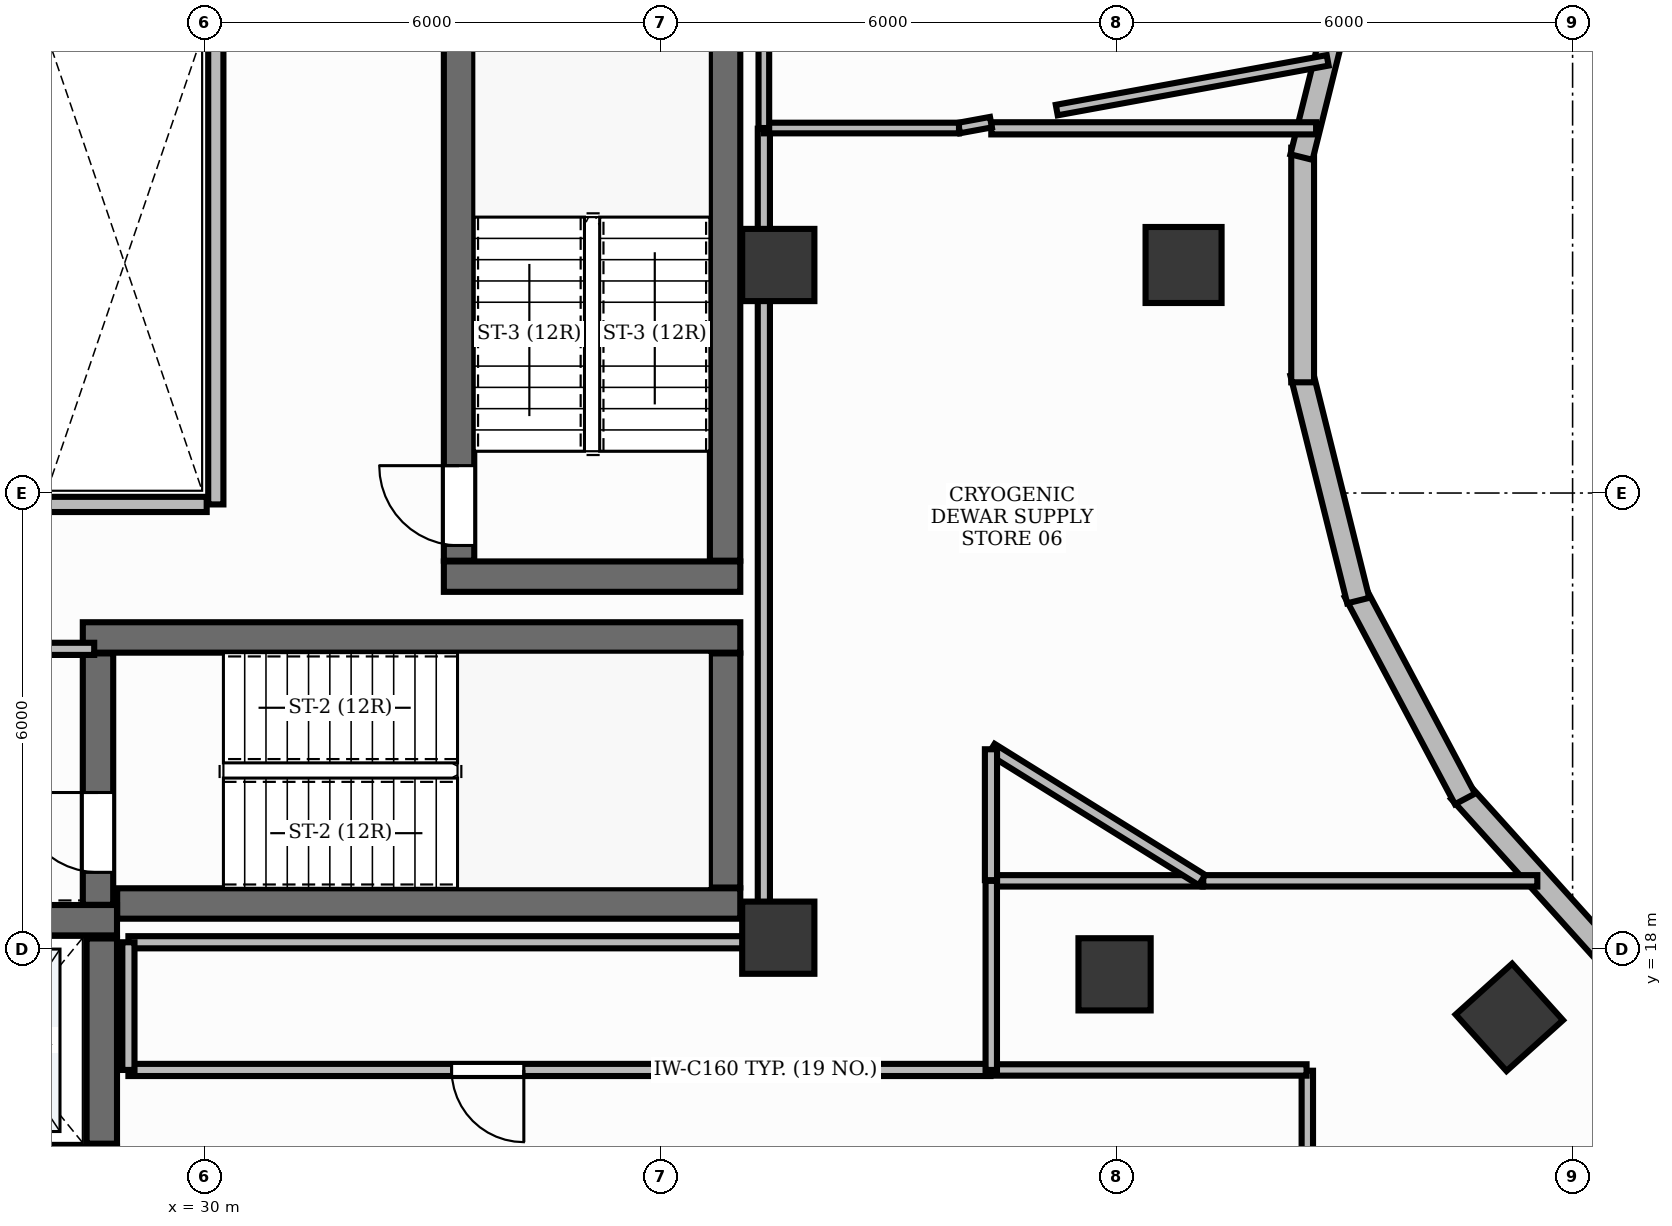
"""IFC4 building model, lengths in metres.
Left out: names, types, materials, properties, quantities, classifications, styles, units other than length and angle.
Written with IfcOpenShell. Run it as: python <this file> out.ifc"""

import sys

from ifc_helpers import new_model, si_unit, direction, frame, frame_2d, origin, origin_2d, place, context, subcontext, project, spatial, rectangle, extrude, element, fill, save


model = new_model("IFC4")
c1 = context("Model", 3, precision=1e-05, world=origin(), true_north=direction((0.0, 1.0)))
c2 = subcontext(c1, "Body", "Model", "MODEL_VIEW")
j1 = project(units=[si_unit("LENGTHUNIT", "METRE"), si_unit("PLANEANGLEUNIT", "RADIAN")], contexts=[c1])
p1 = place(None, origin())
s1 = spatial("IfcSite", under=j1, at=p1, CompositionType="ELEMENT")
p2 = place(p1, origin())
s2 = spatial("IfcBuilding", under=s1, at=p2, CompositionType="ELEMENT")
p3 = place(p2, frame((0.0, 0.0, 196.2)))
s3 = spatial("IfcBuildingStorey", under=s2, at=p3, CompositionType="ELEMENT", Elevation=196.2)
p4 = place(p3, frame((28.852, 18.6, 0.0), z_axis=(0.0, 0.0, 1.0), x_axis=(1.0, 0.0, 0.0)))
e1 = element("IfcWall", 1, at=p4, inside=s3, PredefinedType="SHEAR", context=c2, shape_type="SweptSolid", body=[
    extrude(rectangle(XDim=8.198, YDim=0.4, at=frame_2d((4.099, 0.0))), origin(), (0.0, 0.0, 1.0), 3.9),
])
p5 = place(p3, frame((28.4, 22.1, 0.0), z_axis=(0.0, 0.0, 1.0), x_axis=(1.0, 0.0, 0.0)))
e2 = element("IfcWall", 2, at=p5, inside=s3, PredefinedType="SHEAR", context=c2, shape_type="SweptSolid", body=[
    extrude(rectangle(XDim=8.65, YDim=0.4, at=frame_2d((4.325, 0.0))), origin(), (0.0, 0.0, 1.0), 3.9),
])
p6 = place(p3, frame((36.85, 18.81, 0.0), z_axis=(0.0, 0.0, 1.0), x_axis=(0.0, 1.0, 0.0)))
e3 = element("IfcWall", 3, at=p6, inside=s3, PredefinedType="SHEAR", context=c2, shape_type="SweptSolid", body=[
    extrude(rectangle(XDim=3.08, YDim=0.4, at=frame_2d((1.54, 0.0))), origin(), (0.0, 0.0, 1.0), 3.9),
])
p7 = place(p3, frame((28.6, 18.582, 0.0), z_axis=(0.0, 0.0, 1.0), x_axis=(0.0, 1.0, 0.0)))
e4 = element("IfcWall", 4, at=p7, inside=s3, PredefinedType="SHEAR", context=c2, shape_type="SweptSolid", body=[
    extrude(rectangle(XDim=3.308, YDim=0.4, at=frame_2d((1.654, 0.0))), origin(), (0.0, 0.0, 1.0), 3.9),
])
p8 = place(p7, frame((0.428, 0.0, 0.0)))
e5 = element("IfcOpeningElement", 5, at=p8, cuts=e4, PredefinedType="OPENING", context=c2, shape_type="SweptSolid", body=[
    extrude(rectangle(XDim=1.05, YDim=2.15, at=frame_2d((0.525, 1.075))), frame((0.0, 0.215, 0.0), z_axis=(0.0, -1.0, 0.0), x_axis=(1.0, 0.0, 0.0)), (0.0, 0.0, 1.0), 0.43),
])
p9 = place(p3, frame((33.15, 22.9, 0.0), z_axis=(0.0, 0.0, 1.0), x_axis=(1.0, 0.0, 0.0)))
e6 = element("IfcWall", 6, at=p9, inside=s3, PredefinedType="SHEAR", context=c2, shape_type="SweptSolid", body=[
    extrude(rectangle(XDim=3.9, YDim=0.4, at=frame_2d((1.95, 0.0))), origin(), (0.0, 0.0, 1.0), 3.9),
])
p10 = place(p3, frame((36.85, 23.11, 0.0), z_axis=(0.0, 0.0, 1.0), x_axis=(0.0, 1.0, 0.0)))
e7 = element("IfcWall", 7, at=p10, inside=s3, PredefinedType="SHEAR", context=c2, shape_type="SweptSolid", body=[
    extrude(rectangle(XDim=7.78, YDim=0.4, at=frame_2d((3.89, 0.0))), origin(), (0.0, 0.0, 1.0), 3.9),
])
p11 = place(p3, frame((33.35, 23.11, 0.0), z_axis=(0.0, 0.0, 1.0), x_axis=(0.0, 1.0, 0.0)))
e8 = element("IfcWall", 8, at=p11, inside=s3, PredefinedType="SHEAR", context=c2, shape_type="SweptSolid", body=[
    extrude(rectangle(XDim=7.78, YDim=0.4, at=frame_2d((3.89, 0.0))), origin(), (0.0, 0.0, 1.0), 3.9),
])
p12 = place(p11, frame((0.2, 0.0, 0.0)))
e9 = element("IfcOpeningElement", 9, at=p12, cuts=e8, PredefinedType="OPENING", context=c2, shape_type="SweptSolid", body=[
    extrude(rectangle(XDim=1.05, YDim=2.15, at=frame_2d((0.525, 1.075))), frame((0.0, 0.215, 0.0), z_axis=(0.0, -1.0, 0.0), x_axis=(1.0, 0.0, 0.0)), (0.0, 0.0, 1.0), 0.43),
])
p13 = place(p3, frame((25.75, 18.38, 0.0), z_axis=(0.0, 0.0, 1.0), x_axis=(1.0, 0.0, 0.0)))
e10 = element("IfcWall", 10, at=p13, inside=s3, PredefinedType="SHEAR", context=c2, shape_type="SweptSolid", body=[
    extrude(rectangle(XDim=3.1, YDim=0.4, at=frame_2d((1.55, 0.0))), origin(), (0.0, 0.0, 1.0), 3.9),
])
p14 = place(p13, frame((0.9, 0.0, 0.0)))
e11 = element("IfcOpeningElement", 11, at=p14, cuts=e10, PredefinedType="OPENING", context=c2, shape_type="SweptSolid", body=[
    extrude(rectangle(XDim=1.3, YDim=2.2, at=frame_2d((0.65, 1.1))), frame((0.0, 0.215, 0.0), z_axis=(0.0, -1.0, 0.0), x_axis=(1.0, 0.0, 0.0)), (0.0, 0.0, 1.0), 0.43),
])
p15 = place(p3, frame((28.65, 15.44, 0.0), z_axis=(0.0, 0.0, 1.0), x_axis=(0.0, 1.0, 0.0)))
e12 = element("IfcWall", 12, at=p15, inside=s3, PredefinedType="SHEAR", context=c2, shape_type="SweptSolid", body=[
    extrude(rectangle(XDim=2.7, YDim=0.4, at=frame_2d((1.35, 0.0))), origin(), (0.0, 0.0, 1.0), 3.9),
])
for number, where, z_axis, x_axis in (
    (13, (37.55, 18.15, -0.0), (0.0, 0.0, 1.0), (1.0, 0.0, 0.0)),
    (14, (37.55, 27.0, -0.0), (0.0, 0.0, 1.0), (1.0, 0.0, 0.0)),
):
    element("IfcColumn", number, at=place(p3, frame(where, z_axis=z_axis, x_axis=x_axis)), inside=s3, PredefinedType="PILASTER", context=c2, shape_type="SweptSolid", body=[
        extrude(rectangle(XDim=0.95, YDim=0.95, at=origin_2d()), origin(), (0.0, 0.0, 1.0), 3.901),
    ])
p16 = place(p3, frame((47.167, 17.102, -0.0), z_axis=(0.0, 0.0, 1.0), x_axis=(-0.669130606359, 0.743144825477, 0.0)))
e15 = element("IfcColumn", 15, at=p16, inside=s3, PredefinedType="COLUMN", context=c2, shape_type="SweptSolid", body=[
    extrude(rectangle(XDim=1.0, YDim=1.0, at=origin_2d()), origin(), (0.0, 0.0, 1.0), 3.901),
])
p17 = place(p3, frame((41.974, 17.668, -0.0), z_axis=(0.0, 0.0, 1.0), x_axis=(1.0, 0.0, 0.0)))
e16 = element("IfcColumn", 16, at=p17, inside=s3, PredefinedType="COLUMN", context=c2, shape_type="SweptSolid", body=[
    extrude(rectangle(XDim=0.95, YDim=0.95, at=origin_2d()), origin(), (0.0, 0.0, 1.0), 3.901),
])
p18 = place(p3, frame((42.882, 27.0, -0.0), z_axis=(0.0, 0.0, 1.0), x_axis=(0.0, 1.0, 0.0)))
e17 = element("IfcColumn", 17, at=p18, inside=s3, PredefinedType="COLUMN", context=c2, shape_type="SweptSolid", body=[
    extrude(rectangle(XDim=1.0, YDim=1.0, at=origin_2d()), origin(), (0.0, 0.0, 1.0), 3.901),
])
p19 = place(p3, frame((48.579, 17.784, 0.0), z_axis=(0.0, 0.0, 1.0), x_axis=(-0.669165704933, 0.743113221079, 0.0)))
e18 = element("IfcWall", 18, at=p19, inside=s3, PredefinedType="STANDARD", context=c2, shape_type="SweptSolid", body=[
    extrude(rectangle(XDim=3.087, YDim=0.3, at=frame_2d((1.543, 0.0))), origin(), (0.0, 0.0, 1.0), 3.9),
])
for number, where, z_axis, x_axis in (
    (19, (46.584, 19.976, 0.0), (0.0, 0.0, 1.0), (-0.469, 0.883, 0.0)),
    (20, (45.18, 22.585, 0.0), (0.0, 0.0, 1.0), (-0.242, 0.97, 0.0)),
):
    element("IfcWall", number, at=place(p3, frame(where, z_axis=z_axis, x_axis=x_axis)), inside=s3, PredefinedType="STANDARD", context=c2, shape_type="SweptSolid", body=[
        extrude(rectangle(XDim=3.087, YDim=0.3, at=frame_2d((1.543, 0.0))), origin(), (0.0, 0.0, 1.0), 2.625),
    ])
p20 = place(p3, frame((44.448, 25.457, 0.0), z_axis=(0.0, 0.0, 1.0), x_axis=(0.0, 1.0, 0.0)))
e21 = element("IfcWall", 21, at=p20, inside=s3, PredefinedType="STANDARD", context=c2, shape_type="SweptSolid", body=[
    extrude(rectangle(XDim=3.087, YDim=0.3, at=frame_2d((1.543, 0.0))), origin(), (0.0, 0.0, 1.0), 3.9),
])
p21 = place(p3, frame((44.433, 28.42, 0.0), z_axis=(0.0, 0.0, 1.0), x_axis=(0.241940068914, 0.970291194979, 0.0)))
e22 = element("IfcWall", 22, at=p21, inside=s3, PredefinedType="STANDARD", context=c2, shape_type="SweptSolid", body=[
    extrude(rectangle(XDim=3.087, YDim=0.3, at=frame_2d((1.543, 0.0))), origin(), (0.0, 0.0, 1.0), 2.625),
])
p22 = place(p3, frame((30.15, 23.85, 0.0), z_axis=(0.0, 0.0, 1.0), x_axis=(0.0, 1.0, 0.0)))
e23 = element("IfcWall", 23, at=p22, inside=s3, PredefinedType="PARTITIONING", context=c2, shape_type="SweptSolid", body=[
    extrude(rectangle(XDim=6.35, YDim=0.2, at=frame_2d((3.175, 0.0))), origin(), (0.0, 0.0, 1.0), 2.22),
])
p23 = place(p3, frame((27.934, 23.85, 0.0), z_axis=(0.0, 0.0, 1.0), x_axis=(1.0, 0.0, 0.0)))
e24 = element("IfcWall", 24, at=p23, inside=s3, PredefinedType="PARTITIONING", context=c2, shape_type="SweptSolid", body=[
    extrude(rectangle(XDim=2.096, YDim=0.2, at=frame_2d((1.048, 0.0))), origin(), (0.0, 0.0, 1.0), 2.22),
])
p24 = place(p3, frame((23.58, 21.95, 0.0), z_axis=(0.0, 0.0, 1.0), x_axis=(1.0, 0.0, 0.0)))
e25 = element("IfcWall", 25, at=p24, inside=s3, PredefinedType="PARTITIONING", context=c2, shape_type="SweptSolid", body=[
    extrude(rectangle(XDim=4.97, YDim=0.16, at=frame_2d((2.485, 0.0))), origin(), (0.0, 0.0, 1.0), 2.22),
])
p25 = place(p3, frame((40.342, 16.41, 0.0), z_axis=(0.0, 0.0, 1.0), x_axis=(-1.0, 0.0, 0.0)))
e26 = element("IfcWall", 26, at=p25, inside=s3, PredefinedType="PARTITIONING", context=c2, shape_type="SweptSolid", body=[
    extrude(rectangle(XDim=11.342, YDim=0.16, at=frame_2d((5.671, 0.0))), origin(), (0.0, 0.0, 1.0), 2.22),
])
p26 = place(p25, frame((6.14, 0.0, 0.0)))
e27 = element("IfcOpeningElement", 27, at=p26, cuts=e26, PredefinedType="OPENING", context=c2, shape_type="SweptSolid", body=[
    extrude(rectangle(XDim=0.95, YDim=2.15, at=frame_2d((0.475, 1.075))), frame((0.0, 0.095, 0.0), z_axis=(0.0, -1.0, 0.0), x_axis=(1.0, 0.0, 0.0)), (0.0, 0.0, 1.0), 0.19),
])
p27 = place(p3, frame((40.352, 18.898, 0.0), z_axis=(0.0, 0.0, 1.0), x_axis=(1.0, 0.0, 0.0)))
e28 = element("IfcWall", 28, at=p27, inside=s3, PredefinedType="PARTITIONING", context=c2, shape_type="SweptSolid", body=[
    extrude(rectangle(XDim=2.781, YDim=0.15, at=frame_2d((1.39, 0.0))), origin(), (0.0, 0.0, 1.0), 2.22),
])
p28 = place(p3, frame((43.141, 18.898, 0.0), z_axis=(0.0, 0.0, 1.0), x_axis=(1.0, 0.0, 0.0)))
e29 = element("IfcWall", 29, at=p28, inside=s3, PredefinedType="PARTITIONING", context=c2, shape_type="SweptSolid", body=[
    extrude(rectangle(XDim=4.395, YDim=0.15, at=frame_2d((2.198, 0.0))), origin(), (0.0, 0.0, 1.0), 2.22),
])
p29 = place(p3, frame((44.51, 12.6, 0.0), z_axis=(0.0, 0.0, 1.0), x_axis=(0.0, 1.0, 0.0)))
e30 = element("IfcWall", 30, at=p29, inside=s3, PredefinedType="PARTITIONING", context=c2, shape_type="SweptSolid", body=[
    extrude(rectangle(XDim=3.8, YDim=0.15, at=frame_2d((1.9, 0.0))), origin(), (0.0, 0.0, 1.0), 2.22),
])
p30 = place(p3, frame((44.5, 16.41, 0.0), z_axis=(0.0, 0.0, 1.0), x_axis=(-1.0, 0.0, 0.0)))
e31 = element("IfcWall", 31, at=p30, inside=s3, PredefinedType="PARTITIONING", context=c2, shape_type="SweptSolid", body=[
    extrude(rectangle(XDim=4.148, YDim=0.15, at=frame_2d((2.074, 0.0))), origin(), (0.0, 0.0, 1.0), 2.22),
])
p31 = place(p3, frame((40.352, 16.41, 0.0), z_axis=(0.0, 0.0, 1.0), x_axis=(0.0, 1.0, 0.0)))
e32 = element("IfcWall", 32, at=p31, inside=s3, PredefinedType="PARTITIONING", context=c2, shape_type="SweptSolid", body=[
    extrude(rectangle(XDim=2.488, YDim=0.15, at=frame_2d((1.244, 0.0))), origin(), (0.0, 0.0, 1.0), 2.22),
])
p32 = place(p3, frame((29.0, 18.09, 0.0), z_axis=(0.0, 0.0, 1.0), x_axis=(1.0, 0.0, 0.0)))
e33 = element("IfcWall", 33, at=p32, inside=s3, PredefinedType="PARTITIONING", context=c2, shape_type="SweptSolid", body=[
    extrude(rectangle(XDim=8.35, YDim=0.16, at=frame_2d((4.175, 0.0))), origin(), (0.0, 0.0, 1.0), 2.22),
])
p33 = place(p3, frame((37.36, 18.1, 0.0), z_axis=(0.0, 0.0, 1.0), x_axis=(0.0, 1.0, 0.0)))
e34 = element("IfcWall", 34, at=p33, inside=s3, PredefinedType="PARTITIONING", context=c2, shape_type="SweptSolid", body=[
    extrude(rectangle(XDim=10.694, YDim=0.16, at=frame_2d((5.347, 0.0))), origin(), (0.0, 0.0, 1.0), 2.22),
])
p34 = place(p3, frame((40.352, 28.798, 0.0), z_axis=(0.0, 0.0, 1.0), x_axis=(1.0, 0.0, 0.0)))
e35 = element("IfcWall", 35, at=p34, inside=s3, PredefinedType="PARTITIONING", context=c2, shape_type="SweptSolid", body=[
    extrude(rectangle(XDim=4.273, YDim=0.16, at=frame_2d((2.137, 0.0))), origin(), (0.0, 0.0, 1.0), 2.22),
])
p35 = place(p3, frame((43.125, 18.908, 0.0), z_axis=(0.0, 0.0, 1.0), x_axis=(-0.848988734201, 0.528410947274, 0.0)))
e36 = element("IfcWall", 36, at=p35, inside=s3, PredefinedType="PARTITIONING", context=c2, shape_type="SweptSolid", body=[
    extrude(rectangle(XDim=3.263, YDim=0.16, at=frame_2d((1.632, 0.0))), origin(), (0.0, 0.0, 1.0), 2.22),
])
p36 = place(p3, frame((40.348, 20.629, 0.0), z_axis=(0.0, 0.0, 1.0), x_axis=(0.0, -1.0, 0.0)))
e37 = element("IfcWall", 37, at=p36, inside=s3, PredefinedType="PARTITIONING", context=c2, shape_type="SweptSolid", body=[
    extrude(rectangle(XDim=1.722, YDim=0.16, at=frame_2d((0.861, 0.0))), origin(), (0.0, 0.0, 1.0), 2.22),
])
p37 = place(p3, frame((29.0, 16.41, 0.0), z_axis=(0.0, 0.0, 1.0), x_axis=(0.0, 1.0, 0.0)))
e38 = element("IfcWall", 38, at=p37, inside=s3, PredefinedType="PARTITIONING", context=c2, shape_type="SweptSolid", body=[
    extrude(rectangle(XDim=1.68, YDim=0.16, at=frame_2d((0.84, 0.0))), origin(), (0.0, 0.0, 1.0), 2.22),
])
p38 = place(p3, frame((44.778, 29.692, 0.0), z_axis=(0.0, 0.0, 1.0), x_axis=(-0.983576469436, -0.180491907776, 0.0)))
e39 = element("IfcWall", 39, at=p38, inside=s3, PredefinedType="PARTITIONING", context=c2, shape_type="SweptSolid", body=[
    extrude(rectangle(XDim=3.624, YDim=0.14, at=frame_2d((1.812, 0.0))), origin(), (0.0, 0.0, 1.0), 2.22),
])
p39 = place(p3, frame((40.348, 28.879, 0.0), z_axis=(0.0, 0.0, 1.0), x_axis=(-0.983557526281, -0.180595106511, 0.0)))
e40 = element("IfcWall", 40, at=p39, inside=s3, PredefinedType="PARTITIONING", context=c2, shape_type="SweptSolid", body=[
    extrude(rectangle(XDim=0.427, YDim=0.14, at=frame_2d((0.214, 0.0))), origin(), (0.0, 0.0, 1.0), 2.22),
])
p40 = place(p3, frame((39.927, 28.802, 0.0), z_axis=(0.0, 0.0, 1.0), x_axis=(-1.0, 0.0, 0.0)))
e41 = element("IfcWall", 41, at=p40, inside=s3, PredefinedType="PARTITIONING", context=c2, shape_type="SweptSolid", body=[
    extrude(rectangle(XDim=2.567, YDim=0.14, at=frame_2d((1.284, 0.0))), origin(), (0.0, 0.0, 1.0), 2.22),
])
p41 = place(p3, frame((37.36, 28.802, 0.0), z_axis=(0.0, 0.0, 1.0), x_axis=(0.0, 1.0, 0.0)))
e42 = element("IfcWall", 42, at=p41, inside=s3, PredefinedType="PARTITIONING", context=c2, shape_type="SweptSolid", body=[
    extrude(rectangle(XDim=7.098, YDim=0.14, at=frame_2d((3.549, 0.0))), origin(), (0.0, 0.0, 1.0), 2.22),
])
p42 = place(p8, origin())
e43 = element("IfcDoor", 43, at=p42, inside=s3, OperationType="SINGLE_SWING_RIGHT", PredefinedType="DOOR", context=c2, shape_type="SweptSolid", body=[
    extrude(rectangle(XDim=1.05, YDim=2.15, at=frame_2d((0.525, 1.075))), frame((0.0, 0.025, 0.0), z_axis=(0.0, -1.0, 0.0), x_axis=(1.0, 0.0, 0.0)), (0.0, 0.0, 1.0), 0.05),
])
fill(e5, e43)
p43 = place(p12, origin())
e44 = element("IfcDoor", 44, at=p43, inside=s3, OperationType="SINGLE_SWING_RIGHT", PredefinedType="DOOR", context=c2, shape_type="SweptSolid", body=[
    extrude(rectangle(XDim=1.05, YDim=2.15, at=frame_2d((0.525, 1.075))), frame((0.0, 0.025, 0.0), z_axis=(0.0, -1.0, 0.0), x_axis=(1.0, 0.0, 0.0)), (0.0, 0.0, 1.0), 0.05),
])
fill(e9, e44)
p44 = place(p26, origin())
e45 = element("IfcDoor", 45, at=p44, inside=s3, OperationType="SINGLE_SWING_LEFT", PredefinedType="DOOR", context=c2, shape_type="SweptSolid", body=[
    extrude(rectangle(XDim=0.95, YDim=2.15, at=frame_2d((0.475, 1.075))), frame((0.0, 0.025, 0.0), z_axis=(0.0, -1.0, 0.0), x_axis=(1.0, 0.0, 0.0)), (0.0, 0.0, 1.0), 0.05),
])
fill(e27, e45)
save(model, sys.argv[1])
